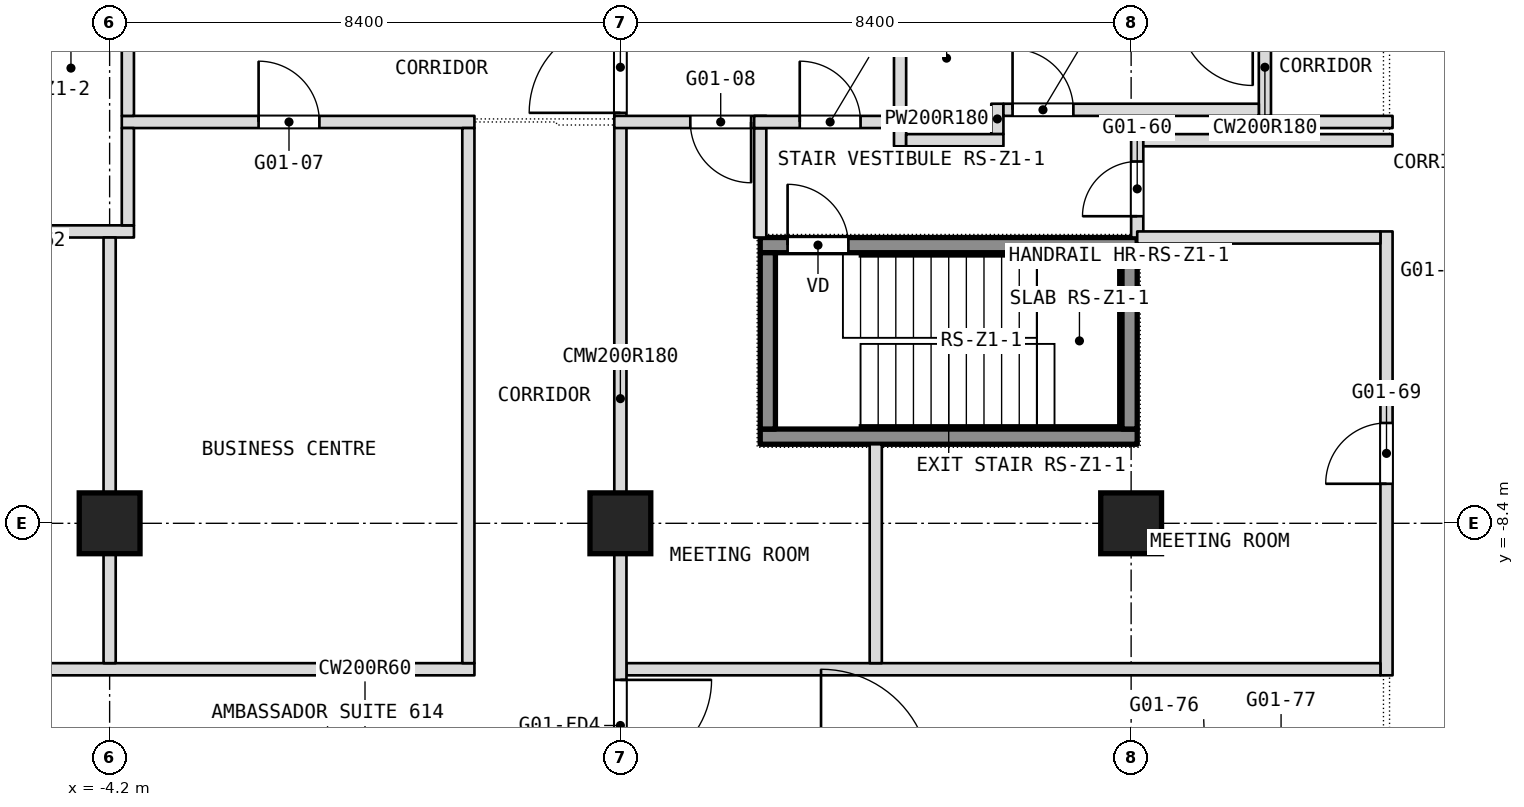
"""IFC4 building model, lengths in metres.
Left out: names, types, materials, properties, quantities, classifications, styles, units other than length and angle.
Written with IfcOpenShell. Run it as: python <this file> out.ifc"""

import sys

from ifc_helpers import new_model, si_unit, direction, frame, frame_2d, origin, origin_2d, place, context, subcontext, project, spatial, rectangle, extrude, element, fill, save


model = new_model("IFC4")
c1 = context("Model", 3, precision=1e-05, world=origin(), true_north=direction((0.0, 1.0)))
c2 = subcontext(c1, "Body", "Model", "MODEL_VIEW")
j1 = project(units=[si_unit("LENGTHUNIT", "METRE"), si_unit("PLANEANGLEUNIT", "RADIAN")], contexts=[c1])
p1 = place(None, origin())
s1 = spatial("IfcSite", under=j1, at=p1, CompositionType="ELEMENT")
p2 = place(p1, origin())
s2 = spatial("IfcBuilding", under=s1, at=p2, CompositionType="ELEMENT")
p3 = place(p2, frame((0.0, 0.0, 36.5)))
s3 = spatial("IfcBuildingStorey", under=s2, at=p3, CompositionType="ELEMENT", Elevation=36.5)
for number, where, z_axis, x_axis in (
    (1, (-4.2, -8.4, -0.15), (0.0, 0.0, 1.0), (1.0, 0.0, 0.0)),
    (2, (4.2, -8.4, -0.15), (0.0, 0.0, 1.0), (1.0, 0.0, 0.0)),
    (3, (12.6, -8.4, -0.15), (0.0, 0.0, 1.0), (1.0, 0.0, 0.0)),
):
    element("IfcColumn", number, at=place(p3, frame(where, z_axis=z_axis, x_axis=x_axis)), inside=s3, PredefinedType="COLUMN", context=c2, shape_type="SweptSolid", body=[
        extrude(rectangle(XDim=1.0, YDim=1.0, at=origin_2d()), origin(), (0.0, 0.0, 1.0), 3.75),
    ])
p4 = place(p3, frame((16.8, -10.9, 0.0), z_axis=(0.0, 0.0, 1.0), x_axis=(0.0, 1.0, 0.0)))
e4 = element("IfcWall", 4, at=p4, inside=s3, PredefinedType="PARTITIONING", context=c2, shape_type="SweptSolid", body=[
    extrude(rectangle(XDim=7.3, YDim=0.2, at=frame_2d((3.65, 0.0))), origin(), (0.0, 0.0, 1.0), 3.34),
])
p5 = place(p4, frame((3.15, 0.0, 0.0)))
e5 = element("IfcOpeningElement", 5, at=p5, cuts=e4, PredefinedType="OPENING", context=c2, shape_type="SweptSolid", body=[
    extrude(rectangle(XDim=1.0, YDim=2.1, at=frame_2d((0.5, 1.05))), frame((0.0, 0.1, 0.0), z_axis=(0.0, -1.0, 0.0), x_axis=(1.0, 0.0, 0.0)), (0.0, 0.0, 1.0), 0.2),
])
p6 = place(p3, frame((14.8, -1.7, 0.0), z_axis=(0.0, 0.0, 1.0), x_axis=(0.0, 1.0, 0.0)))
e6 = element("IfcWall", 6, at=p6, inside=s3, PredefinedType="PARTITIONING", context=c2, shape_type="SweptSolid", body=[
    extrude(rectangle(XDim=1.6, YDim=0.2, at=frame_2d((0.8, 0.0))), origin(), (0.0, 0.0, 1.0), 3.34),
])
p7 = place(p3, frame((12.7, -3.7, 0.0), z_axis=(0.0, 0.0, 1.0), x_axis=(0.0, 1.0, 0.0)))
e7 = element("IfcWall", 7, at=p7, inside=s3, PredefinedType="PARTITIONING", context=c2, shape_type="SweptSolid", body=[
    extrude(rectangle(XDim=1.7, YDim=0.2, at=frame_2d((0.85, 0.0))), origin(), (0.0, 0.0, 1.0), 3.34),
])
p8 = place(p7, frame((0.35, 0.0, 0.0)))
e8 = element("IfcOpeningElement", 8, at=p8, cuts=e7, PredefinedType="OPENING", context=c2, shape_type="SweptSolid", body=[
    extrude(rectangle(XDim=0.9, YDim=2.1, at=frame_2d((0.45, 1.05))), frame((0.0, 0.1, 0.0), z_axis=(0.0, -1.0, 0.0), x_axis=(1.0, 0.0, 0.0)), (0.0, 0.0, 1.0), 0.2),
])
p9 = place(p3, frame((-16.7, -10.8, 0.0), z_axis=(0.0, 0.0, 1.0), x_axis=(1.0, 0.0, 0.0)))
e9 = element("IfcWall", 9, at=p9, inside=s3, PredefinedType="PARTITIONING", context=c2, shape_type="SweptSolid", body=[
    extrude(rectangle(XDim=18.5, YDim=0.2, at=frame_2d((9.25, 0.0))), origin(), (0.0, 0.0, 1.0), 3.34),
])
p10 = place(p9, frame((7.8, 0.0, 0.0)))
e10 = element("IfcOpeningElement", 10, at=p10, cuts=e9, PredefinedType="OPENING", context=c2, shape_type="SweptSolid", body=[
    extrude(rectangle(XDim=1.0, YDim=2.1, at=frame_2d((0.5, 1.05))), frame((0.0, 0.1, 0.0), z_axis=(0.0, -1.0, 0.0), x_axis=(1.0, 0.0, 0.0)), (0.0, 0.0, 1.0), 0.2),
])
p11 = place(p3, frame((4.3, -10.8, 0.0), z_axis=(0.0, 0.0, 1.0), x_axis=(1.0, 0.0, 0.0)))
e11 = element("IfcWall", 11, at=p11, inside=s3, PredefinedType="PARTITIONING", context=c2, shape_type="SweptSolid", body=[
    extrude(rectangle(XDim=12.4, YDim=0.2, at=frame_2d((6.2, 0.0))), origin(), (0.0, 0.0, 1.0), 3.34),
])
p12 = place(p3, frame((10.4, -2.0, 0.0), z_axis=(0.0, 0.0, 1.0), x_axis=(0.0, 1.0, 0.0)))
e12 = element("IfcWall", 12, at=p12, inside=s3, PredefinedType="PARTITIONING", context=c2, shape_type="SweptSolid", body=[
    extrude(rectangle(XDim=0.5, YDim=0.2, at=frame_2d((0.25, 0.0))), origin(), (0.0, 0.0, 1.0), 3.34),
])
p13 = place(p3, frame((8.8, -2.2, 0.0), z_axis=(0.0, 0.0, 1.0), x_axis=(0.0, 1.0, 0.0)))
e13 = element("IfcWall", 13, at=p13, inside=s3, PredefinedType="PARTITIONING", context=c2, shape_type="SweptSolid", body=[
    extrude(rectangle(XDim=0.3, YDim=0.2, at=frame_2d((0.15, 0.0))), origin(), (0.0, 0.0, 1.0), 3.34),
])
p14 = place(p3, frame((8.8, -1.7, 0.0), z_axis=(0.0, 0.0, 1.0), x_axis=(0.0, 1.0, 0.0)))
e14 = element("IfcWall", 14, at=p14, inside=s3, PredefinedType="PARTITIONING", context=c2, shape_type="SweptSolid", body=[
    extrude(rectangle(XDim=1.6, YDim=0.2, at=frame_2d((0.8, 0.0))), origin(), (0.0, 0.0, 1.0), 3.34),
])
p15 = place(p3, frame((8.4, -10.7, 0.0), z_axis=(0.0, 0.0, 1.0), x_axis=(0.0, 1.0, 0.0)))
e15 = element("IfcWall", 15, at=p15, inside=s3, PredefinedType="PARTITIONING", context=c2, shape_type="SweptSolid", body=[
    extrude(rectangle(XDim=3.6, YDim=0.2, at=frame_2d((1.8, 0.0))), origin(), (0.0, 0.0, 1.0), 3.34),
])
p16 = place(p3, frame((6.5, -3.7, 0.0), z_axis=(0.0, 0.0, 1.0), x_axis=(0.0, 1.0, 0.0)))
e16 = element("IfcWall", 16, at=p16, inside=s3, PredefinedType="PARTITIONING", context=c2, shape_type="SweptSolid", body=[
    extrude(rectangle(XDim=1.8, YDim=0.2, at=frame_2d((0.9, 0.0))), origin(), (0.0, 0.0, 1.0), 3.34),
])
p17 = place(p3, frame((4.2, -12.7, 0.0), z_axis=(0.0, 0.0, 1.0), x_axis=(0.0, 1.0, 0.0)))
e17 = element("IfcWall", 17, at=p17, inside=s3, PredefinedType="PARTITIONING", context=c2, shape_type="SweptSolid", body=[
    extrude(rectangle(XDim=12.7, YDim=0.2, at=frame_2d((6.35, 0.0))), origin(), (0.0, 0.0, 1.0), 3.34),
])
p18 = place(p17, frame((11.05, 0.0, 0.0)))
e18 = element("IfcOpeningElement", 18, at=p18, cuts=e17, PredefinedType="OPENING", context=c2, shape_type="SweptSolid", body=[
    extrude(rectangle(XDim=1.5, YDim=2.1, at=frame_2d((0.75, 1.05))), frame((0.0, 0.1, 0.0), z_axis=(0.0, -1.0, 0.0), x_axis=(1.0, 0.0, 0.0)), (0.0, 0.0, 1.0), 0.2),
])
p19 = place(p17, frame((0.225, 0.0, 0.0)))
e19 = element("IfcOpeningElement", 19, at=p19, cuts=e17, PredefinedType="OPENING", context=c2, shape_type="SweptSolid", body=[
    extrude(rectangle(XDim=1.5, YDim=2.1, at=frame_2d((0.75, 1.05))), frame((0.0, 0.1, 0.0), z_axis=(0.0, -1.0, 0.0), x_axis=(1.0, 0.0, 0.0)), (0.0, 0.0, 1.0), 0.2),
])
p20 = place(p3, frame((12.7, -3.7, 0.0), z_axis=(0.0, 0.0, 1.0), x_axis=(1.0, 0.0, 0.0)))
e20 = element("IfcWall", 20, at=p20, inside=s3, PredefinedType="PARTITIONING", context=c2, shape_type="SweptSolid", body=[
    extrude(rectangle(XDim=4.0, YDim=0.2, at=frame_2d((2.0, 0.0))), origin(), (0.0, 0.0, 1.0), 3.34),
])
p21 = place(p3, frame((-5.4, -3.6, 0.0), z_axis=(0.0, 0.0, 1.0), x_axis=(1.0, 0.0, 0.0)))
e21 = element("IfcWall", 21, at=p21, inside=s3, PredefinedType="PARTITIONING", context=c2, shape_type="SweptSolid", body=[
    extrude(rectangle(XDim=1.6, YDim=0.2, at=frame_2d((0.8, 0.0))), origin(), (0.0, 0.0, 1.0), 3.34),
])
p22 = place(p3, frame((8.9, -2.1, 0.0), z_axis=(0.0, 0.0, 1.0), x_axis=(1.0, 0.0, 0.0)))
e22 = element("IfcWall", 22, at=p22, inside=s3, PredefinedType="PARTITIONING", context=c2, shape_type="SweptSolid", body=[
    extrude(rectangle(XDim=1.6, YDim=0.2, at=frame_2d((0.8, 0.0))), origin(), (0.0, 0.0, 1.0), 3.34),
])
p23 = place(p3, frame((12.8, -2.1, 0.0), z_axis=(0.0, 0.0, 1.0), x_axis=(1.0, 0.0, 0.0)))
e23 = element("IfcWall", 23, at=p23, inside=s3, PredefinedType="PARTITIONING", context=c2, shape_type="SweptSolid", body=[
    extrude(rectangle(XDim=4.1, YDim=0.2, at=frame_2d((2.05, 0.0))), origin(), (0.0, 0.0, 1.0), 3.34),
])
p24 = place(p3, frame((-4.0, -1.8, 0.0), z_axis=(0.0, 0.0, 1.0), x_axis=(1.0, 0.0, 0.0)))
e24 = element("IfcWall", 24, at=p24, inside=s3, PredefinedType="PARTITIONING", context=c2, shape_type="SweptSolid", body=[
    extrude(rectangle(XDim=5.8, YDim=0.2, at=frame_2d((2.9, 0.0))), origin(), (0.0, 0.0, 1.0), 3.34),
])
p25 = place(p24, frame((2.25, 0.0, 0.0)))
e25 = element("IfcOpeningElement", 25, at=p25, cuts=e24, PredefinedType="OPENING", context=c2, shape_type="SweptSolid", body=[
    extrude(rectangle(XDim=1.0, YDim=2.1, at=frame_2d((0.5, 1.05))), frame((0.0, 0.1, 0.0), z_axis=(0.0, -1.0, 0.0), x_axis=(1.0, 0.0, 0.0)), (0.0, 0.0, 1.0), 0.2),
])
p26 = place(p3, frame((4.1, -1.8, 0.0), z_axis=(0.0, 0.0, 1.0), x_axis=(1.0, 0.0, 0.0)))
e26 = element("IfcWall", 26, at=p26, inside=s3, PredefinedType="PARTITIONING", context=c2, shape_type="SweptSolid", body=[
    extrude(rectangle(XDim=2.5, YDim=0.2, at=frame_2d((1.25, 0.0))), origin(), (0.0, 0.0, 1.0), 3.34),
])
p27 = place(p26, frame((1.25, 0.0, 0.0)))
e27 = element("IfcOpeningElement", 27, at=p27, cuts=e26, PredefinedType="OPENING", context=c2, shape_type="SweptSolid", body=[
    extrude(rectangle(XDim=1.0, YDim=2.1, at=frame_2d((0.5, 1.05))), frame((0.0, 0.1, 0.0), z_axis=(0.0, -1.0, 0.0), x_axis=(1.0, 0.0, 0.0)), (0.0, 0.0, 1.0), 0.2),
])
p28 = place(p3, frame((6.4, -1.8, 0.0), z_axis=(0.0, 0.0, 1.0), x_axis=(1.0, 0.0, 0.0)))
e28 = element("IfcWall", 28, at=p28, inside=s3, PredefinedType="PARTITIONING", context=c2, shape_type="SweptSolid", body=[
    extrude(rectangle(XDim=2.5, YDim=0.2, at=frame_2d((1.25, 0.0))), origin(), (0.0, 0.0, 1.0), 3.34),
])
p29 = place(p28, frame((0.75, 0.0, 0.0)))
e29 = element("IfcOpeningElement", 29, at=p29, cuts=e28, PredefinedType="OPENING", context=c2, shape_type="SweptSolid", body=[
    extrude(rectangle(XDim=1.0, YDim=2.1, at=frame_2d((0.5, 1.05))), frame((0.0, 0.1, 0.0), z_axis=(0.0, -1.0, 0.0), x_axis=(1.0, 0.0, 0.0)), (0.0, 0.0, 1.0), 0.2),
])
p30 = place(p3, frame((14.8, -1.8, 0.0), z_axis=(0.0, 0.0, 1.0), x_axis=(1.0, 0.0, 0.0)))
e30 = element("IfcWall", 30, at=p30, inside=s3, PredefinedType="PARTITIONING", context=c2, shape_type="SweptSolid", body=[
    extrude(rectangle(XDim=2.1, YDim=0.2, at=frame_2d((1.05, 0.0))), origin(), (0.0, 0.0, 1.0), 3.34),
])
p31 = place(p3, frame((1.7, -10.7, 0.0), z_axis=(0.0, 0.0, 1.0), x_axis=(0.0, 1.0, 0.0)))
e31 = element("IfcWall", 31, at=p31, inside=s3, PredefinedType="PARTITIONING", context=c2, shape_type="SweptSolid", body=[
    extrude(rectangle(XDim=8.8, YDim=0.2, at=frame_2d((4.4, 0.0))), origin(), (0.0, 0.0, 1.0), 3.34),
])
p32 = place(p3, frame((10.5, -1.6, 0.0), z_axis=(0.0, 0.0, 1.0), x_axis=(1.0, 0.0, 0.0)))
e32 = element("IfcWall", 32, at=p32, inside=s3, PredefinedType="PARTITIONING", context=c2, shape_type="SweptSolid", body=[
    extrude(rectangle(XDim=4.2, YDim=0.2, at=frame_2d((2.1, 0.0))), origin(), (0.0, 0.0, 1.0), 3.34),
])
p33 = place(p32, frame((0.15, 0.0, 0.0)))
e33 = element("IfcOpeningElement", 33, at=p33, cuts=e32, PredefinedType="OPENING", context=c2, shape_type="SweptSolid", body=[
    extrude(rectangle(XDim=1.0, YDim=2.1, at=frame_2d((0.5, 1.05))), frame((0.0, 0.1, 0.0), z_axis=(0.0, -1.0, 0.0), x_axis=(1.0, 0.0, 0.0)), (0.0, 0.0, 1.0), 0.2),
])
p34 = place(p3, frame((-3.9, -3.5, 0.0), z_axis=(0.0, 0.0, 1.0), x_axis=(0.0, 1.0, 0.0)))
e34 = element("IfcWall", 34, at=p34, inside=s3, PredefinedType="PARTITIONING", context=c2, shape_type="SweptSolid", body=[
    extrude(rectangle(XDim=1.6, YDim=0.2, at=frame_2d((0.8, 0.0))), origin(), (0.0, 0.0, 1.0), 3.34),
])
p35 = place(p3, frame((-3.9, -1.7, 0.0), z_axis=(0.0, 0.0, 1.0), x_axis=(0.0, 1.0, 0.0)))
e35 = element("IfcWall", 35, at=p35, inside=s3, PredefinedType="PARTITIONING", context=c2, shape_type="SweptSolid", body=[
    extrude(rectangle(XDim=1.6, YDim=0.2, at=frame_2d((0.8, 0.0))), origin(), (0.0, 0.0, 1.0), 3.34),
])
p36 = place(p3, frame((-4.2, -10.7, 0.0), z_axis=(0.0, 0.0, 1.0), x_axis=(0.0, 1.0, 0.0)))
e36 = element("IfcWall", 36, at=p36, inside=s3, PredefinedType="PARTITIONING", context=c2, shape_type="SweptSolid", body=[
    extrude(rectangle(XDim=7.0, YDim=0.2, at=frame_2d((3.5, 0.0))), origin(), (0.0, 0.0, 1.0), 3.34),
])
p37 = place(p3, frame((6.5, -6.975, -0.15), z_axis=(0.0, 0.0, 1.0), x_axis=(1.0, 0.0, 0.0)))
e37 = element("IfcWall", 37, at=p37, inside=s3, PredefinedType="SHEAR", context=c2, shape_type="SweptSolid", body=[
    extrude(rectangle(XDim=6.2, YDim=0.25, at=frame_2d((3.1, 0.0))), origin(), (0.0, 0.0, 1.0), 3.85),
])
p38 = place(p3, frame((6.5, -3.825, -0.15), z_axis=(0.0, 0.0, 1.0), x_axis=(1.0, 0.0, 0.0)))
e38 = element("IfcWall", 38, at=p38, inside=s3, PredefinedType="SHEAR", context=c2, shape_type="SweptSolid", body=[
    extrude(rectangle(XDim=6.2, YDim=0.25, at=frame_2d((3.1, 0.0))), origin(), (0.0, 0.0, 1.0), 3.85),
])
p39 = place(p38, frame((0.45, 0.0, 0.0)))
e39 = element("IfcOpeningElement", 39, at=p39, cuts=e38, PredefinedType="OPENING", context=c2, shape_type="SweptSolid", body=[
    extrude(rectangle(XDim=1.0, YDim=2.1, at=frame_2d((0.5, 1.05))), frame((0.0, 0.125, 0.0), z_axis=(0.0, -1.0, 0.0), x_axis=(1.0, 0.0, 0.0)), (0.0, 0.0, 1.0), 0.25),
])
for number, where, z_axis, x_axis in (
    (40, (6.625, -6.85, -0.15), (0.0, 0.0, 1.0), (0.0, 1.0, 0.0)),
    (41, (12.575, -6.85, -0.15), (0.0, 0.0, 1.0), (0.0, 1.0, 0.0)),
):
    element("IfcWall", number, at=place(p3, frame(where, z_axis=z_axis, x_axis=x_axis)), inside=s3, PredefinedType="SHEAR", context=c2, shape_type="SweptSolid", body=[
        extrude(rectangle(XDim=2.9, YDim=0.25, at=frame_2d((1.45, 0.0))), origin(), (0.0, 0.0, 1.0), 3.85),
    ])
p40 = place(p5, origin())
e42 = element("IfcDoor", 42, at=p40, inside=s3, OperationType="SINGLE_SWING_LEFT", PredefinedType="DOOR", context=c2, shape_type="SweptSolid", body=[
    extrude(rectangle(XDim=1.0, YDim=2.1, at=frame_2d((0.5, 1.05))), frame((0.0, 0.025, 0.0), z_axis=(0.0, -1.0, 0.0), x_axis=(1.0, 0.0, 0.0)), (0.0, 0.0, 1.0), 0.05),
])
fill(e5, e42)
p41 = place(p8, origin())
e43 = element("IfcDoor", 43, at=p41, inside=s3, OperationType="SINGLE_SWING_LEFT", PredefinedType="DOOR", context=c2, shape_type="SweptSolid", body=[
    extrude(rectangle(XDim=0.9, YDim=2.1, at=frame_2d((0.45, 1.05))), frame((0.0, 0.025, 0.0), z_axis=(0.0, -1.0, 0.0), x_axis=(1.0, 0.0, 0.0)), (0.0, 0.0, 1.0), 0.05),
])
fill(e8, e43)
p42 = place(p25, origin())
e44 = element("IfcDoor", 44, at=p42, inside=s3, OperationType="SINGLE_SWING_LEFT", PredefinedType="DOOR", context=c2, shape_type="SweptSolid", body=[
    extrude(rectangle(XDim=1.0, YDim=2.1, at=frame_2d((0.5, 1.05))), frame((0.0, 0.025, 0.0), z_axis=(0.0, -1.0, 0.0), x_axis=(1.0, 0.0, 0.0)), (0.0, 0.0, 1.0), 0.05),
])
fill(e25, e44)
p43 = place(p27, origin())
e45 = element("IfcDoor", 45, at=p43, inside=s3, OperationType="SINGLE_SWING_RIGHT", PredefinedType="DOOR", context=c2, shape_type="SweptSolid", body=[
    extrude(rectangle(XDim=1.0, YDim=2.1, at=frame_2d((0.5, 1.05))), frame((0.0, 0.025, 0.0), z_axis=(0.0, -1.0, 0.0), x_axis=(1.0, 0.0, 0.0)), (0.0, 0.0, 1.0), 0.05),
])
fill(e27, e45)
p44 = place(p29, origin())
e46 = element("IfcDoor", 46, at=p44, inside=s3, OperationType="SINGLE_SWING_LEFT", PredefinedType="DOOR", context=c2, shape_type="SweptSolid", body=[
    extrude(rectangle(XDim=1.0, YDim=2.1, at=frame_2d((0.5, 1.05))), frame((0.0, 0.025, 0.0), z_axis=(0.0, -1.0, 0.0), x_axis=(1.0, 0.0, 0.0)), (0.0, 0.0, 1.0), 0.05),
])
fill(e29, e46)
p45 = place(p33, origin())
e47 = element("IfcDoor", 47, at=p45, inside=s3, OperationType="SINGLE_SWING_LEFT", PredefinedType="DOOR", context=c2, shape_type="SweptSolid", body=[
    extrude(rectangle(XDim=1.0, YDim=2.1, at=frame_2d((0.5, 1.05))), frame((0.0, 0.025, 0.0), z_axis=(0.0, -1.0, 0.0), x_axis=(1.0, 0.0, 0.0)), (0.0, 0.0, 1.0), 0.05),
])
fill(e33, e47)
p46 = place(p39, origin())
e48 = element("IfcDoor", 48, at=p46, inside=s3, OperationType="SINGLE_SWING_LEFT", PredefinedType="DOOR", context=c2, shape_type="SweptSolid", body=[
    extrude(rectangle(XDim=1.0, YDim=2.1, at=frame_2d((0.5, 1.05))), frame((0.0, 0.025, 0.0), z_axis=(0.0, -1.0, 0.0), x_axis=(1.0, 0.0, 0.0)), (0.0, 0.0, 1.0), 0.05),
])
fill(e39, e48)
p47 = place(p18, origin())
e49 = element("IfcDoor", 49, at=p47, inside=s3, OperationType="DOUBLE_DOOR_DOUBLE_SWING", PredefinedType="DOOR", context=c2, shape_type="SweptSolid", body=[
    extrude(rectangle(XDim=1.5, YDim=2.1, at=frame_2d((0.75, 1.05))), frame((0.0, 0.025, 0.0), z_axis=(0.0, -1.0, 0.0), x_axis=(1.0, 0.0, 0.0)), (0.0, 0.0, 1.0), 0.05),
])
fill(e18, e49)
p48 = place(p19, origin())
e50 = element("IfcDoor", 50, at=p48, inside=s3, OperationType="DOUBLE_DOOR_DOUBLE_SWING", PredefinedType="DOOR", context=c2, shape_type="SweptSolid", body=[
    extrude(rectangle(XDim=1.5, YDim=2.1, at=frame_2d((0.75, 1.05))), frame((0.0, 0.025, 0.0), z_axis=(0.0, -1.0, 0.0), x_axis=(1.0, 0.0, 0.0)), (0.0, 0.0, 1.0), 0.05),
])
fill(e19, e50)
save(model, sys.argv[1])
